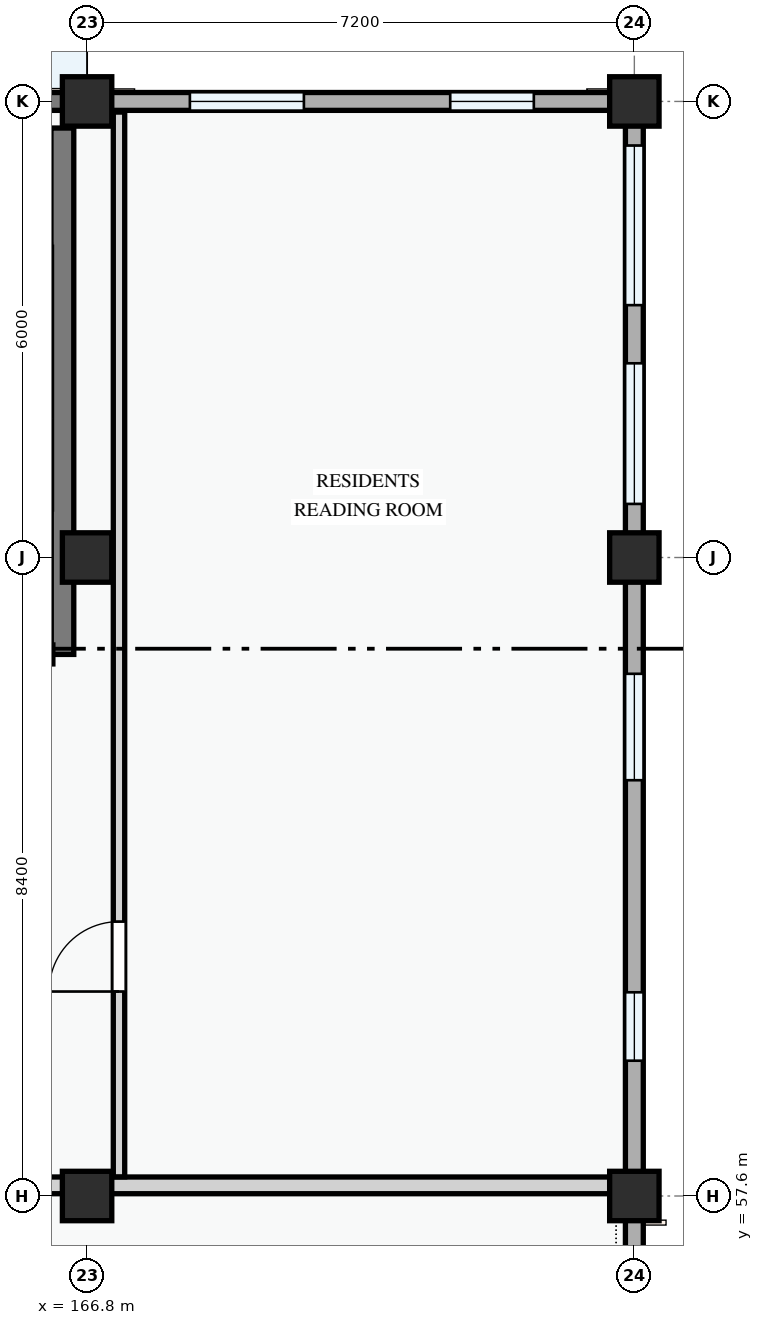
"""IFC4 building model, lengths in metres.
Left out: names, types, materials, properties, quantities, classifications, styles, units other than length and angle.
Written with IfcOpenShell. Run it as: python <this file> out.ifc"""

import sys

from ifc_helpers import new_model, si_unit, direction, frame, frame_2d, origin, origin_2d, place, context, subcontext, project, spatial, rectangle, extrude, element, fill, save


model = new_model("IFC4")
c1 = context("Model", 3, precision=1e-05, world=origin(), true_north=direction((0.0, 1.0)))
c2 = subcontext(c1, "Body", "Model", "MODEL_VIEW")
j1 = project(units=[si_unit("LENGTHUNIT", "METRE"), si_unit("PLANEANGLEUNIT", "RADIAN")], contexts=[c1])
p1 = place(None, origin())
s1 = spatial("IfcSite", under=j1, at=p1, CompositionType="ELEMENT")
p2 = place(p1, origin())
s2 = spatial("IfcBuilding", under=s1, at=p2, CompositionType="ELEMENT")
p3 = place(p2, origin())
s3 = spatial("IfcBuildingStorey", under=s2, at=p3, CompositionType="ELEMENT", Elevation=0.0)
for number, where, z_axis, x_axis in (
    (1, (166.8, 57.6, 0.0), (0.0, 0.0, 1.0), (1.0, 0.0, 0.0)),
    (2, (166.8, 66.0, 0.0), (0.0, 0.0, 1.0), (1.0, 0.0, 0.0)),
    (3, (166.8, 72.0, 0.0), (0.0, 0.0, 1.0), (1.0, 0.0, 0.0)),
    (4, (174.0, 57.6, 0.0), (0.0, 0.0, 1.0), (1.0, 0.0, 0.0)),
    (5, (174.0, 66.0, 0.0), (0.0, 0.0, 1.0), (1.0, 0.0, 0.0)),
    (6, (174.0, 72.0, 0.0), (0.0, 0.0, 1.0), (1.0, 0.0, 0.0)),
):
    element("IfcColumn", number, at=place(p3, frame(where, z_axis=z_axis, x_axis=x_axis)), inside=s3, PredefinedType="COLUMN", context=c2, shape_type="SweptSolid", body=[
        extrude(rectangle(XDim=0.65, YDim=0.65, at=origin_2d()), origin(), (0.0, 0.0, 1.0), 4.5),
    ])
p4 = place(p3, frame((174.0, 51.6, 0.0), z_axis=(0.0, 0.0, 1.0), x_axis=(0.0, 1.0, 0.0)))
e7 = element("IfcWall", 7, at=p4, inside=s3, PredefinedType="STANDARD", context=c2, shape_type="SweptSolid", body=[
    extrude(rectangle(XDim=6.0, YDim=0.235, at=frame_2d((3.0, 0.0))), origin(), (0.0, 0.0, 1.0), 3.585),
])
p5 = place(p4, frame((2.2, 0.0, 0.0)))
e8 = element("IfcOpeningElement", 8, at=p5, cuts=e7, PredefinedType="OPENING", context=c2, shape_type="SweptSolid", body=[
    extrude(rectangle(XDim=1.6, YDim=2.35, at=frame_2d((0.8, 1.175))), frame((0.0, 0.127, 0.0), z_axis=(0.0, -1.0, 0.0), x_axis=(1.0, 0.0, 0.0)), (0.0, 0.0, 1.0), 0.255),
])
p6 = place(p3, frame((174.0, 57.6, 0.0), z_axis=(0.0, 0.0, 1.0), x_axis=(0.0, 1.0, 0.0)))
e9 = element("IfcWall", 9, at=p6, inside=s3, PredefinedType="STANDARD", context=c2, shape_type="SweptSolid", body=[
    extrude(rectangle(XDim=8.4, YDim=0.235, at=frame_2d((4.2, 0.0))), origin(), (0.0, 0.0, 1.0), 3.485),
])
p7 = place(p6, frame((1.78, 0.0, 0.78)))
e10 = element("IfcOpeningElement", 10, at=p7, cuts=e9, PredefinedType="OPENING", context=c2, shape_type="SweptSolid", body=[
    extrude(rectangle(XDim=0.9, YDim=1.2, at=frame_2d((0.45, 0.6))), frame((0.0, 0.127, 0.0), z_axis=(0.0, -1.0, 0.0), x_axis=(1.0, 0.0, 0.0)), (0.0, 0.0, 1.0), 0.255),
])
p8 = place(p6, frame((5.47, 0.0, 0.78)))
e11 = element("IfcOpeningElement", 11, at=p8, cuts=e9, PredefinedType="OPENING", context=c2, shape_type="SweptSolid", body=[
    extrude(rectangle(XDim=1.4, YDim=1.45, at=frame_2d((0.7, 0.725))), frame((0.0, 0.127, 0.0), z_axis=(0.0, -1.0, 0.0), x_axis=(1.0, 0.0, 0.0)), (0.0, 0.0, 1.0), 0.255),
])
p9 = place(p3, frame((174.0, 66.0, 0.0), z_axis=(0.0, 0.0, 1.0), x_axis=(0.0, 1.0, 0.0)))
e12 = element("IfcWall", 12, at=p9, inside=s3, PredefinedType="STANDARD", context=c2, shape_type="SweptSolid", body=[
    extrude(rectangle(XDim=6.0, YDim=0.235, at=frame_2d((3.0, 0.0))), origin(), (0.0, 0.0, 1.0), 3.585),
])
p10 = place(p9, frame((0.705, 0.0, 0.78)))
e13 = element("IfcOpeningElement", 13, at=p10, cuts=e12, PredefinedType="OPENING", context=c2, shape_type="SweptSolid", body=[
    extrude(rectangle(XDim=1.85, YDim=1.6, at=frame_2d((0.925, 0.8))), frame((0.0, 0.127, 0.0), z_axis=(0.0, -1.0, 0.0), x_axis=(1.0, 0.0, 0.0)), (0.0, 0.0, 1.0), 0.255),
])
p11 = place(p9, frame((3.32, 0.0, 0.78)))
e14 = element("IfcOpeningElement", 14, at=p11, cuts=e12, PredefinedType="OPENING", context=c2, shape_type="SweptSolid", body=[
    extrude(rectangle(XDim=2.1, YDim=1.8, at=frame_2d((1.05, 0.9))), frame((0.0, 0.127, 0.0), z_axis=(0.0, -1.0, 0.0), x_axis=(1.0, 0.0, 0.0)), (0.0, 0.0, 1.0), 0.255),
])
p12 = place(p3, frame((174.0, 72.0, 0.0), z_axis=(0.0, 0.0, 1.0), x_axis=(-1.0, 0.0, 0.0)))
e15 = element("IfcWall", 15, at=p12, inside=s3, PredefinedType="STANDARD", context=c2, shape_type="SweptSolid", body=[
    extrude(rectangle(XDim=7.2, YDim=0.235, at=frame_2d((3.6, 0.0))), origin(), (0.0, 0.0, 1.0), 3.485),
])
p13 = place(p12, frame((1.323, 0.0, 0.78)))
e16 = element("IfcOpeningElement", 16, at=p13, cuts=e15, PredefinedType="OPENING", context=c2, shape_type="SweptSolid", body=[
    extrude(rectangle(XDim=1.1, YDim=1.3, at=frame_2d((0.55, 0.65))), frame((0.0, 0.127, 0.0), z_axis=(0.0, -1.0, 0.0), x_axis=(1.0, 0.0, 0.0)), (0.0, 0.0, 1.0), 0.255),
])
p14 = place(p12, frame((4.347, 0.0, 0.78)))
e17 = element("IfcOpeningElement", 17, at=p14, cuts=e15, PredefinedType="OPENING", context=c2, shape_type="SweptSolid", body=[
    extrude(rectangle(XDim=1.5, YDim=1.5, at=frame_2d((0.75, 0.75))), frame((0.0, 0.127, 0.0), z_axis=(0.0, -1.0, 0.0), x_axis=(1.0, 0.0, 0.0)), (0.0, 0.0, 1.0), 0.255),
])
p15 = place(p3, frame((166.8, 72.0, 0.0), z_axis=(0.0, 0.0, 1.0), x_axis=(-1.0, 0.0, 0.0)))
e18 = element("IfcWall", 18, at=p15, inside=s3, PredefinedType="STANDARD", context=c2, shape_type="SweptSolid", body=[
    extrude(rectangle(XDim=8.4, YDim=0.235, at=frame_2d((4.2, 0.0))), origin(), (0.0, 0.0, 1.0), 4.2),
])
p16 = place(p15, frame((6.4, 0.0, 0.0)))
e19 = element("IfcOpeningElement", 19, at=p16, cuts=e18, PredefinedType="OPENING", context=c2, shape_type="SweptSolid", body=[
    extrude(rectangle(XDim=1.6, YDim=2.35, at=frame_2d((0.8, 1.175))), frame((0.0, 0.127, 0.0), z_axis=(0.0, -1.0, 0.0), x_axis=(1.0, 0.0, 0.0)), (0.0, 0.0, 1.0), 0.255),
])
p17 = place(p15, frame((1.25, 0.0, 0.0)))
e20 = element("IfcOpeningElement", 20, at=p17, cuts=e18, PredefinedType="OPENING", context=c2, shape_type="SweptSolid", body=[
    extrude(rectangle(XDim=1.3, YDim=2.2, at=frame_2d((0.65, 1.1))), frame((0.0, 0.127, 0.0), z_axis=(0.0, -1.0, 0.0), x_axis=(1.0, 0.0, 0.0)), (0.0, 0.0, 1.0), 0.255),
])
p18 = place(p3, frame((166.475, 71.65, 0.0), z_axis=(0.0, 0.0, 1.0), x_axis=(0.0, -1.0, 0.0)))
e21 = element("IfcWall", 21, at=p18, inside=s3, PredefinedType="SHEAR", context=c2, shape_type="SweptSolid", body=[
    extrude(rectangle(XDim=6.925, YDim=0.3, at=frame_2d((3.462, 0.0))), origin(), (0.0, 0.0, 1.0), 4.2),
])
p19 = place(p3, frame((162.064, 57.74, 0.0), z_axis=(0.0, 0.0, 1.0), x_axis=(1.0, 0.0, 0.0)))
e22 = element("IfcWall", 22, at=p19, inside=s3, PredefinedType="PARTITIONING", context=c2, shape_type="SweptSolid", body=[
    extrude(rectangle(XDim=11.816, YDim=0.22, at=frame_2d((5.908, 0.0))), origin(), (0.0, 0.0, 1.0), 3.485),
])
p20 = place(p3, frame((167.22, 57.852, 0.0), z_axis=(0.0, 0.0, 1.0), x_axis=(0.0, 1.0, 0.0)))
e23 = element("IfcWall", 23, at=p20, inside=s3, PredefinedType="PARTITIONING", context=c2, shape_type="SweptSolid", body=[
    extrude(rectangle(XDim=14.008, YDim=0.15, at=frame_2d((7.004, 0.0))), origin(), (0.0, 0.0, 1.0), 3.485),
])
p21 = place(p20, frame((2.438, 0.0, 0.0)))
e24 = element("IfcOpeningElement", 24, at=p21, cuts=e23, PredefinedType="OPENING", context=c2, shape_type="SweptSolid", body=[
    extrude(rectangle(XDim=0.92, YDim=2.1, at=frame_2d((0.46, 1.05))), frame((0.0, 0.085, 0.0), z_axis=(0.0, -1.0, 0.0), x_axis=(1.0, 0.0, 0.0)), (0.0, 0.0, 1.0), 0.17),
])
p22 = place(p7, origin())
e25 = element("IfcWindow", 25, at=p22, inside=s3, PartitioningType="SINGLE_PANEL", PredefinedType="WINDOW", context=c2, shape_type="SweptSolid", body=[
    extrude(rectangle(XDim=0.9, YDim=1.2, at=frame_2d((0.45, 0.6))), frame((0.0, 0.03, 0.0), z_axis=(0.0, -1.0, 0.0), x_axis=(1.0, 0.0, 0.0)), (0.0, 0.0, 1.0), 0.06),
])
fill(e10, e25)
p23 = place(p8, origin())
e26 = element("IfcWindow", 26, at=p23, inside=s3, PartitioningType="SINGLE_PANEL", PredefinedType="WINDOW", context=c2, shape_type="SweptSolid", body=[
    extrude(rectangle(XDim=1.4, YDim=1.45, at=frame_2d((0.7, 0.725))), frame((0.0, 0.03, 0.0), z_axis=(0.0, -1.0, 0.0), x_axis=(1.0, 0.0, 0.0)), (0.0, 0.0, 1.0), 0.06),
])
fill(e11, e26)
p24 = place(p10, origin())
e27 = element("IfcWindow", 27, at=p24, inside=s3, PartitioningType="DOUBLE_PANEL_VERTICAL", PredefinedType="WINDOW", context=c2, shape_type="SweptSolid", body=[
    extrude(rectangle(XDim=1.85, YDim=1.6, at=frame_2d((0.925, 0.8))), frame((0.0, 0.03, 0.0), z_axis=(0.0, -1.0, 0.0), x_axis=(1.0, 0.0, 0.0)), (0.0, 0.0, 1.0), 0.06),
])
fill(e13, e27)
p25 = place(p11, origin())
e28 = element("IfcWindow", 28, at=p25, inside=s3, PartitioningType="DOUBLE_PANEL_VERTICAL", PredefinedType="WINDOW", context=c2, shape_type="SweptSolid", body=[
    extrude(rectangle(XDim=2.1, YDim=1.8, at=frame_2d((1.05, 0.9))), frame((0.0, 0.03, 0.0), z_axis=(0.0, -1.0, 0.0), x_axis=(1.0, 0.0, 0.0)), (0.0, 0.0, 1.0), 0.06),
])
fill(e14, e28)
p26 = place(p13, origin())
e29 = element("IfcWindow", 29, at=p26, inside=s3, PartitioningType="SINGLE_PANEL", PredefinedType="WINDOW", context=c2, shape_type="SweptSolid", body=[
    extrude(rectangle(XDim=1.1, YDim=1.3, at=frame_2d((0.55, 0.65))), frame((0.0, 0.03, 0.0), z_axis=(0.0, -1.0, 0.0), x_axis=(1.0, 0.0, 0.0)), (0.0, 0.0, 1.0), 0.06),
])
fill(e16, e29)
p27 = place(p14, origin())
e30 = element("IfcWindow", 30, at=p27, inside=s3, PartitioningType="SINGLE_PANEL", PredefinedType="WINDOW", context=c2, shape_type="SweptSolid", body=[
    extrude(rectangle(XDim=1.5, YDim=1.5, at=frame_2d((0.75, 0.75))), frame((0.0, 0.03, 0.0), z_axis=(0.0, -1.0, 0.0), x_axis=(1.0, 0.0, 0.0)), (0.0, 0.0, 1.0), 0.06),
])
fill(e17, e30)
p28 = place(p21, origin())
e31 = element("IfcDoor", 31, at=p28, inside=s3, OperationType="SINGLE_SWING_LEFT", PredefinedType="DOOR", context=c2, shape_type="SweptSolid", body=[
    extrude(rectangle(XDim=0.92, YDim=2.1, at=frame_2d((0.46, 1.05))), frame((0.0, 0.025, 0.0), z_axis=(0.0, -1.0, 0.0), x_axis=(1.0, 0.0, 0.0)), (0.0, 0.0, 1.0), 0.05),
])
fill(e24, e31)
save(model, sys.argv[1])
